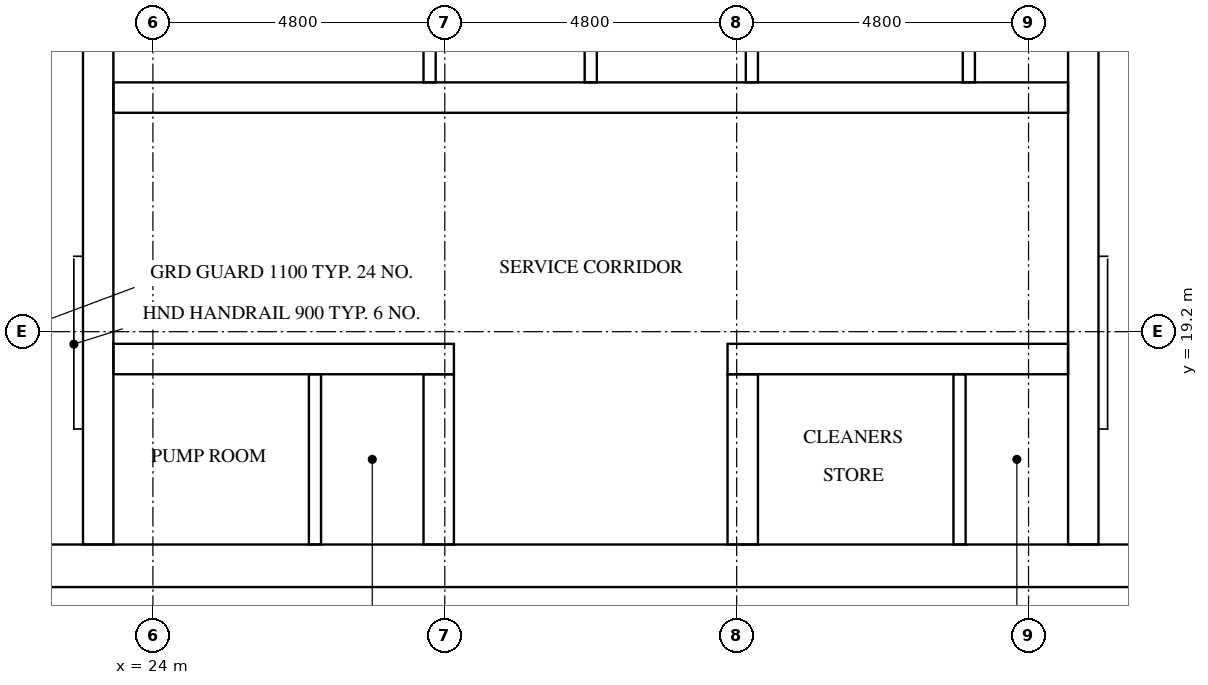
"""IFC4 building model, lengths in metres.
Left out: names, types, materials, properties, quantities, classifications, styles, units other than length and angle.
Written with IfcOpenShell. Run it as: python <this file> out.ifc"""

import sys

from ifc_helpers import new_model, si_unit, direction, frame, frame_2d, origin, place, context, subcontext, project, spatial, rectangle, extrude, element, fill, save


model = new_model("IFC4")
c1 = context("Model", 3, precision=1e-05, world=origin(), true_north=direction((0.0, 1.0)))
c2 = subcontext(c1, "Body", "Model", "MODEL_VIEW")
j1 = project(units=[si_unit("LENGTHUNIT", "METRE"), si_unit("PLANEANGLEUNIT", "RADIAN")], contexts=[c1])
p1 = place(None, origin())
s1 = spatial("IfcSite", under=j1, at=p1, CompositionType="ELEMENT")
p2 = place(p1, origin())
s2 = spatial("IfcBuilding", under=s1, at=p2, CompositionType="ELEMENT")
p3 = place(p2, frame((0.0, 0.0, 215.8)))
s3 = spatial("IfcBuildingStorey", under=s2, at=p3, CompositionType="ELEMENT", Elevation=215.8)
p4 = place(p3, frame((15.0, 15.35, 0.0), z_axis=(0.0, 0.0, 1.0), x_axis=(1.0, 0.0, 0.0)))
e1 = element("IfcWall", 1, at=p4, inside=s3, PredefinedType="SHEAR", context=c2, shape_type="SweptSolid", body=[
    extrude(rectangle(XDim=32.4, YDim=0.7, at=frame_2d((16.2, 0.0))), origin(), (0.0, 0.0, 1.0), 3.2),
])
p5 = place(p4, frame((15.3, 0.0, 0.0)))
e2 = element("IfcOpeningElement", 2, at=p5, cuts=e1, PredefinedType="OPENING", context=c2, shape_type="SweptSolid", body=[
    extrude(rectangle(XDim=1.8, YDim=2.1, at=frame_2d((0.9, 1.05))), frame((0.0, 0.36, 0.0), z_axis=(0.0, -1.0, 0.0), x_axis=(1.0, 0.0, 0.0)), (0.0, 0.0, 1.0), 0.72),
])
p6 = place(p3, frame((23.1, 15.7, 0.0), z_axis=(0.0, 0.0, 1.0), x_axis=(0.0, 1.0, 0.0)))
e3 = element("IfcWall", 3, at=p6, inside=s3, PredefinedType="SHEAR", context=c2, shape_type="SweptSolid", body=[
    extrude(rectangle(XDim=21.4, YDim=0.5, at=frame_2d((10.7, 0.0))), origin(), (0.0, 0.0, 1.0), 3.2),
])
p7 = place(p3, frame((39.3, 15.7, 0.0), z_axis=(0.0, 0.0, 1.0), x_axis=(0.0, 1.0, 0.0)))
e4 = element("IfcWall", 4, at=p7, inside=s3, PredefinedType="SHEAR", context=c2, shape_type="SweptSolid", body=[
    extrude(rectangle(XDim=8.55, YDim=0.5, at=frame_2d((4.275, 0.0))), origin(), (0.0, 0.0, 1.0), 3.2),
])
p8 = place(p3, frame((23.35, 18.75, 0.0), z_axis=(0.0, 0.0, 1.0), x_axis=(1.0, 0.0, 0.0)))
e5 = element("IfcWall", 5, at=p8, inside=s3, PredefinedType="SHEAR", context=c2, shape_type="SweptSolid", body=[
    extrude(rectangle(XDim=5.6, YDim=0.5, at=frame_2d((2.8, 0.0))), origin(), (0.0, 0.0, 1.0), 3.2),
])
p9 = place(p8, frame((1.107, 0.0, 0.0)))
e6 = element("IfcOpeningElement", 6, at=p9, cuts=e5, PredefinedType="OPENING", context=c2, shape_type="SweptSolid", body=[
    extrude(rectangle(XDim=1.0, YDim=2.1, at=frame_2d((0.5, 1.05))), frame((0.0, 0.26, 0.0), z_axis=(0.0, -1.0, 0.0), x_axis=(1.0, 0.0, 0.0)), (0.0, 0.0, 1.0), 0.52),
])
p10 = place(p8, frame((3.758, 0.0, 0.0)))
e7 = element("IfcOpeningElement", 7, at=p10, cuts=e5, PredefinedType="OPENING", context=c2, shape_type="SweptSolid", body=[
    extrude(rectangle(XDim=1.0, YDim=2.1, at=frame_2d((0.5, 1.05))), frame((0.0, 0.26, 0.0), z_axis=(0.0, -1.0, 0.0), x_axis=(1.0, 0.0, 0.0)), (0.0, 0.0, 1.0), 0.52),
])
p11 = place(p3, frame((33.45, 18.75, 0.0), z_axis=(0.0, 0.0, 1.0), x_axis=(1.0, 0.0, 0.0)))
e8 = element("IfcWall", 8, at=p11, inside=s3, PredefinedType="SHEAR", context=c2, shape_type="SweptSolid", body=[
    extrude(rectangle(XDim=5.6, YDim=0.5, at=frame_2d((2.8, 0.0))), origin(), (0.0, 0.0, 1.0), 3.2),
])
p12 = place(p11, frame((1.607, 0.0, 0.0)))
e9 = element("IfcOpeningElement", 9, at=p12, cuts=e8, PredefinedType="OPENING", context=c2, shape_type="SweptSolid", body=[
    extrude(rectangle(XDim=1.0, YDim=2.1, at=frame_2d((0.5, 1.05))), frame((0.0, 0.26, 0.0), z_axis=(0.0, -1.0, 0.0), x_axis=(1.0, 0.0, 0.0)), (0.0, 0.0, 1.0), 0.52),
])
p13 = place(p11, frame((4.258, 0.0, 0.0)))
e10 = element("IfcOpeningElement", 10, at=p13, cuts=e8, PredefinedType="OPENING", context=c2, shape_type="SweptSolid", body=[
    extrude(rectangle(XDim=1.0, YDim=2.1, at=frame_2d((0.5, 1.05))), frame((0.0, 0.26, 0.0), z_axis=(0.0, -1.0, 0.0), x_axis=(1.0, 0.0, 0.0)), (0.0, 0.0, 1.0), 0.52),
])
p14 = place(p3, frame((23.35, 23.05, 0.0), z_axis=(0.0, 0.0, 1.0), x_axis=(1.0, 0.0, 0.0)))
e11 = element("IfcWall", 11, at=p14, inside=s3, PredefinedType="SHEAR", context=c2, shape_type="SweptSolid", body=[
    extrude(rectangle(XDim=15.7, YDim=0.5, at=frame_2d((7.85, 0.0))), origin(), (0.0, 0.0, 1.0), 3.2),
])
p15 = place(p14, frame((2.05, 0.0, 0.0)))
e12 = element("IfcOpeningElement", 12, at=p15, cuts=e11, PredefinedType="OPENING", context=c2, shape_type="SweptSolid", body=[
    extrude(rectangle(XDim=1.0, YDim=2.1, at=frame_2d((0.5, 1.05))), frame((0.0, 0.26, 0.0), z_axis=(0.0, -1.0, 0.0), x_axis=(1.0, 0.0, 0.0)), (0.0, 0.0, 1.0), 0.52),
])
p16 = place(p14, frame((11.784, 0.0, 0.0)))
e13 = element("IfcOpeningElement", 13, at=p16, cuts=e11, PredefinedType="OPENING", context=c2, shape_type="SweptSolid", body=[
    extrude(rectangle(XDim=1.0, YDim=2.1, at=frame_2d((0.5, 1.05))), frame((0.0, 0.26, 0.0), z_axis=(0.0, -1.0, 0.0), x_axis=(1.0, 0.0, 0.0)), (0.0, 0.0, 1.0), 0.52),
])
p17 = place(p14, frame((14.434, 0.0, 0.0)))
e14 = element("IfcOpeningElement", 14, at=p17, cuts=e11, PredefinedType="OPENING", context=c2, shape_type="SweptSolid", body=[
    extrude(rectangle(XDim=1.0, YDim=2.1, at=frame_2d((0.5, 1.05))), frame((0.0, 0.26, 0.0), z_axis=(0.0, -1.0, 0.0), x_axis=(1.0, 0.0, 0.0)), (0.0, 0.0, 1.0), 0.52),
])
for number, where, z_axis, x_axis in (
    (15, (28.7, 15.7, 0.0), (0.0, 0.0, 1.0), (0.0, 1.0, 0.0)),
    (16, (33.7, 15.7, 0.0), (0.0, 0.0, 1.0), (0.0, 1.0, 0.0)),
):
    element("IfcWall", number, at=place(p3, frame(where, z_axis=z_axis, x_axis=x_axis)), inside=s3, PredefinedType="SHEAR", context=c2, shape_type="SweptSolid", body=[
        extrude(rectangle(XDim=2.8, YDim=0.5, at=frame_2d((1.4, 0.0))), origin(), (0.0, 0.0, 1.0), 3.2),
    ])
for number, where, z_axis, x_axis in (
    (17, (28.55, 23.3, 0.0), (0.0, 0.0, 1.0), (0.0, 1.0, 0.0)),
    (18, (31.2, 23.3, 0.0), (0.0, 0.0, 1.0), (0.0, 1.0, 0.0)),
    (19, (33.85, 23.3, 0.0), (0.0, 0.0, 1.0), (0.0, 1.0, 0.0)),
):
    element("IfcWall", number, at=place(p3, frame(where, z_axis=z_axis, x_axis=x_axis)), inside=s3, PredefinedType="SOLIDWALL", context=c2, shape_type="SweptSolid", body=[
        extrude(rectangle(XDim=2.6, YDim=0.2, at=frame_2d((1.3, 0.0))), origin(), (0.0, 0.0, 1.0), 3.2),
    ])
p18 = place(p3, frame((37.418, 23.3, 0.0), z_axis=(0.0, 0.0, 1.0), x_axis=(0.0, 1.0, 0.0)))
e20 = element("IfcWall", 20, at=p18, inside=s3, PredefinedType="PARTITIONING", context=c2, shape_type="SweptSolid", body=[
    extrude(rectangle(XDim=2.6, YDim=0.2, at=frame_2d((1.3, 0.0))), origin(), (0.0, 0.0, 1.0), 3.2),
])
for number, where, z_axis, x_axis in (
    (21, (26.665, 15.7, 0.0), (0.0, 0.0, 1.0), (0.0, 1.0, 0.0)),
    (22, (37.265, 15.7, 0.0), (0.0, 0.0, 1.0), (0.0, 1.0, 0.0)),
):
    element("IfcWall", number, at=place(p3, frame(where, z_axis=z_axis, x_axis=x_axis)), inside=s3, PredefinedType="PARTITIONING", context=c2, shape_type="SweptSolid", body=[
        extrude(rectangle(XDim=2.8, YDim=0.2, at=frame_2d((1.4, 0.0))), origin(), (0.0, 0.0, 1.0), 3.2),
    ])
p19 = place(p5, frame((1.8, 0.0, 0.0), z_axis=(0.0, 0.0, 1.0), x_axis=(-1.0, 0.0, 0.0)))
e23 = element("IfcDoor", 23, at=p19, inside=s3, OperationType="DOUBLE_DOOR_SINGLE_SWING", PredefinedType="DOOR", context=c2, shape_type="SweptSolid", body=[
    extrude(rectangle(XDim=1.8, YDim=2.1, at=frame_2d((0.9, 1.05))), frame((0.0, 0.025, 0.0), z_axis=(0.0, -1.0, 0.0), x_axis=(1.0, 0.0, 0.0)), (0.0, 0.0, 1.0), 0.05),
])
fill(e2, e23)
p20 = place(p15, frame((1.0, 0.0, 0.0), z_axis=(0.0, 0.0, 1.0), x_axis=(-1.0, 0.0, 0.0)))
e24 = element("IfcDoor", 24, at=p20, inside=s3, OperationType="SINGLE_SWING_LEFT", PredefinedType="DOOR", context=c2, shape_type="SweptSolid", body=[
    extrude(rectangle(XDim=1.0, YDim=2.1, at=frame_2d((0.5, 1.05))), frame((0.0, 0.025, 0.0), z_axis=(0.0, -1.0, 0.0), x_axis=(1.0, 0.0, 0.0)), (0.0, 0.0, 1.0), 0.05),
])
fill(e12, e24)
p21 = place(p16, frame((1.0, 0.0, 0.0), z_axis=(0.0, 0.0, 1.0), x_axis=(-1.0, 0.0, 0.0)))
e25 = element("IfcDoor", 25, at=p21, inside=s3, OperationType="SINGLE_SWING_RIGHT", PredefinedType="DOOR", context=c2, shape_type="SweptSolid", body=[
    extrude(rectangle(XDim=1.0, YDim=2.1, at=frame_2d((0.5, 1.05))), frame((0.0, 0.025, 0.0), z_axis=(0.0, -1.0, 0.0), x_axis=(1.0, 0.0, 0.0)), (0.0, 0.0, 1.0), 0.05),
])
fill(e13, e25)
p22 = place(p17, frame((1.0, 0.0, 0.0), z_axis=(0.0, 0.0, 1.0), x_axis=(-1.0, 0.0, 0.0)))
e26 = element("IfcDoor", 26, at=p22, inside=s3, OperationType="SINGLE_SWING_LEFT", PredefinedType="DOOR", context=c2, shape_type="SweptSolid", body=[
    extrude(rectangle(XDim=1.0, YDim=2.1, at=frame_2d((0.5, 1.05))), frame((0.0, 0.025, 0.0), z_axis=(0.0, -1.0, 0.0), x_axis=(1.0, 0.0, 0.0)), (0.0, 0.0, 1.0), 0.05),
])
fill(e14, e26)
p23 = place(p9, origin())
e27 = element("IfcDoor", 27, at=p23, inside=s3, OperationType="SINGLE_SWING_RIGHT", PredefinedType="DOOR", context=c2, shape_type="SweptSolid", body=[
    extrude(rectangle(XDim=1.0, YDim=2.1, at=frame_2d((0.5, 1.05))), frame((0.0, 0.025, 0.0), z_axis=(0.0, -1.0, 0.0), x_axis=(1.0, 0.0, 0.0)), (0.0, 0.0, 1.0), 0.05),
])
fill(e6, e27)
p24 = place(p10, origin())
e28 = element("IfcDoor", 28, at=p24, inside=s3, OperationType="SINGLE_SWING_LEFT", PredefinedType="DOOR", context=c2, shape_type="SweptSolid", body=[
    extrude(rectangle(XDim=1.0, YDim=2.1, at=frame_2d((0.5, 1.05))), frame((0.0, 0.025, 0.0), z_axis=(0.0, -1.0, 0.0), x_axis=(1.0, 0.0, 0.0)), (0.0, 0.0, 1.0), 0.05),
])
fill(e7, e28)
p25 = place(p12, origin())
e29 = element("IfcDoor", 29, at=p25, inside=s3, OperationType="SINGLE_SWING_RIGHT", PredefinedType="DOOR", context=c2, shape_type="SweptSolid", body=[
    extrude(rectangle(XDim=1.0, YDim=2.1, at=frame_2d((0.5, 1.05))), frame((0.0, 0.025, 0.0), z_axis=(0.0, -1.0, 0.0), x_axis=(1.0, 0.0, 0.0)), (0.0, 0.0, 1.0), 0.05),
])
fill(e9, e29)
p26 = place(p13, origin())
e30 = element("IfcDoor", 30, at=p26, inside=s3, OperationType="SINGLE_SWING_LEFT", PredefinedType="DOOR", context=c2, shape_type="SweptSolid", body=[
    extrude(rectangle(XDim=1.0, YDim=2.1, at=frame_2d((0.5, 1.05))), frame((0.0, 0.025, 0.0), z_axis=(0.0, -1.0, 0.0), x_axis=(1.0, 0.0, 0.0)), (0.0, 0.0, 1.0), 0.05),
])
fill(e10, e30)
save(model, sys.argv[1])
